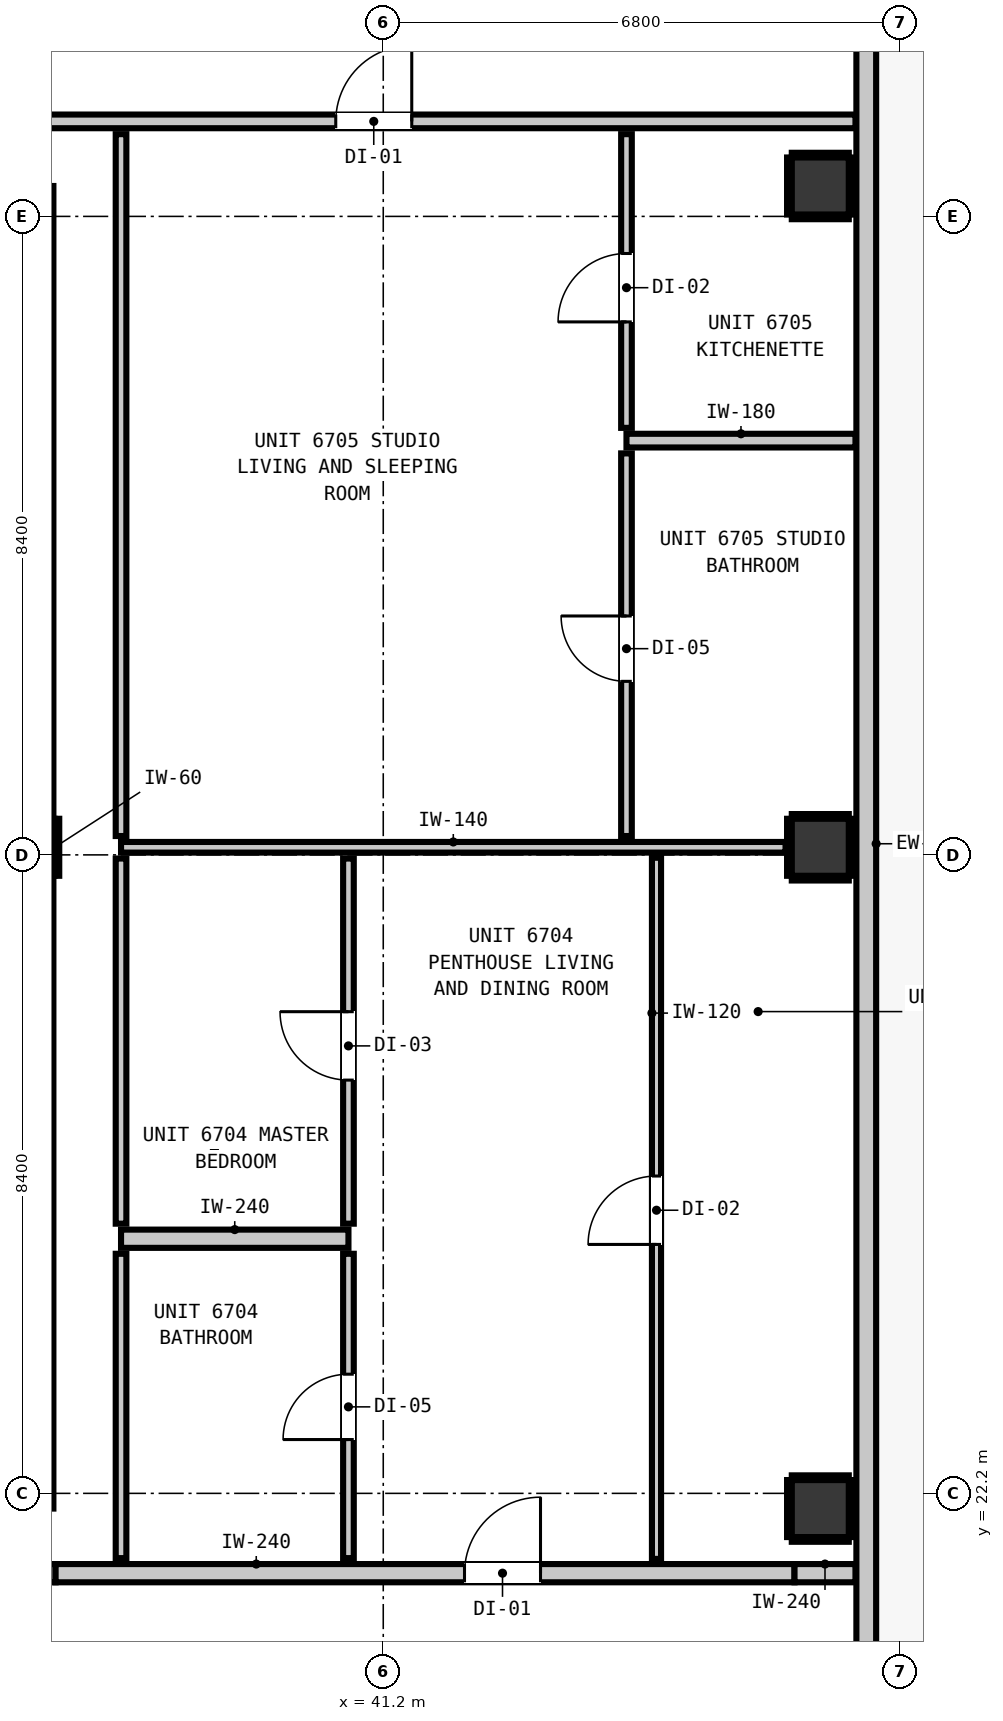
"""IFC4 building model, lengths in metres.
Left out: names, types, materials, properties, quantities, classifications, styles, units other than length and angle.
Written with IfcOpenShell. Run it as: python <this file> out.ifc"""

import sys

from ifc_helpers import new_model, si_unit, direction, frame, frame_2d, origin, origin_2d, place, context, subcontext, project, spatial, rectangle, extrude, element, fill, save


model = new_model("IFC4")
c1 = context("Model", 3, precision=1e-05, world=origin(), true_north=direction((0.0, 1.0)))
c2 = subcontext(c1, "Body", "Model", "MODEL_VIEW")
j1 = project(units=[si_unit("LENGTHUNIT", "METRE"), si_unit("PLANEANGLEUNIT", "RADIAN")], contexts=[c1])
p1 = place(None, origin())
s1 = spatial("IfcSite", under=j1, at=p1, CompositionType="ELEMENT")
p2 = place(p1, origin())
s2 = spatial("IfcBuilding", under=s1, at=p2, CompositionType="ELEMENT")
p3 = place(p2, frame((0.0, 0.0, 231.28)))
s3 = spatial("IfcBuildingStorey", under=s2, at=p3, CompositionType="ELEMENT", Elevation=231.28)
p4 = place(p3, frame((36.5, 30.7, 0.0), z_axis=(0.0, 0.0, 1.0), x_axis=(1.0, 0.0, 0.0)))
e1 = element("IfcColumn", 1, at=p4, inside=s3, PredefinedType="COLUMN", context=c2, shape_type="SweptSolid", body=[
    extrude(rectangle(XDim=0.75, YDim=0.75, at=origin_2d()), origin(), (0.0, 0.0, 1.0), 3.32),
])
p5 = place(p3, frame((36.46, 22.0, 0.0), z_axis=(0.0, 0.0, 1.0), x_axis=(0.0, 1.0, 0.0)))
e2 = element("IfcWall", 2, at=p5, inside=s3, PredefinedType="SHEAR", context=c2, shape_type="SweptSolid", body=[
    extrude(rectangle(XDim=8.32, YDim=0.8, at=frame_2d((4.16, 0.0))), origin(), (0.0, 0.0, 1.0), 3.32),
])
p6 = place(p3, frame((36.46, 31.08, 0.0), z_axis=(0.0, 0.0, 1.0), x_axis=(0.0, 1.0, 0.0)))
e3 = element("IfcWall", 3, at=p6, inside=s3, PredefinedType="SHEAR", context=c2, shape_type="SweptSolid", body=[
    extrude(rectangle(XDim=8.32, YDim=0.8, at=frame_2d((4.16, 0.0))), origin(), (0.0, 0.0, 1.0), 3.32),
])
for number, where, z_axis, x_axis in (
    (4, (46.95, 22.0, -0.2), (0.0, 0.0, 1.0), (1.0, 0.0, 0.0)),
    (5, (46.95, 30.7, -0.2), (0.0, 0.0, 1.0), (1.0, 0.0, 0.0)),
    (6, (46.95, 39.4, -0.2), (0.0, 0.0, 1.0), (1.0, 0.0, 0.0)),
):
    element("IfcColumn", number, at=place(p3, frame(where, z_axis=z_axis, x_axis=x_axis)), inside=s3, PredefinedType="COLUMN", context=c2, shape_type="SweptSolid", body=[
        extrude(rectangle(XDim=0.75, YDim=0.75, at=origin_2d()), origin(), (0.0, 0.0, 1.0), 3.52),
    ])
p7 = place(p3, frame((47.555, 48.855, 0.0), z_axis=(0.0, 0.0, 1.0), x_axis=(0.0, -1.0, 0.0)))
e7 = element("IfcWall", 7, at=p7, inside=s3, PredefinedType="STANDARD", context=c2, shape_type="SweptSolid", body=[
    extrude(rectangle(XDim=30.31, YDim=0.26, at=frame_2d((15.155, 0.0))), origin(), (0.0, 0.0, 1.0), 3.1),
])
p8 = place(p7, frame((0.91, 0.0, 0.0)))
e8 = element("IfcOpeningElement", 8, at=p8, cuts=e7, PredefinedType="OPENING", context=c2, shape_type="SweptSolid", body=[
    extrude(rectangle(XDim=1.0, YDim=2.15, at=frame_2d((0.5, 1.075))), frame((0.0, 0.14, 0.0), z_axis=(0.0, -1.0, 0.0), x_axis=(1.0, 0.0, 0.0)), (0.0, 0.0, 1.0), 0.28),
])
p9 = place(p7, frame((3.107, 0.0, 0.85)))
e9 = element("IfcOpeningElement", 9, at=p9, cuts=e7, PredefinedType="OPENING", context=c2, shape_type="SweptSolid", body=[
    extrude(rectangle(XDim=2.7, YDim=2.0, at=frame_2d((1.35, 1.0))), frame((0.0, 0.14, 0.0), z_axis=(0.0, -1.0, 0.0), x_axis=(1.0, 0.0, 0.0)), (0.0, 0.0, 1.0), 0.28),
])
p10 = place(p3, frame((10.787, 21.15, 0.0), z_axis=(0.0, 0.0, 1.0), x_axis=(1.0, 0.0, 0.0)))
e10 = element("IfcWall", 10, at=p10, inside=s3, PredefinedType="PARTITIONING", context=c2, shape_type="SweptSolid", body=[
    extrude(rectangle(XDim=26.102, YDim=0.24, at=frame_2d((13.051, 0.0))), origin(), (0.0, 0.0, 1.0), 3.1),
])
p11 = place(p10, frame((7.423, 0.0, 0.0)))
e11 = element("IfcOpeningElement", 11, at=p11, cuts=e10, PredefinedType="OPENING", context=c2, shape_type="SweptSolid", body=[
    extrude(rectangle(XDim=1.1, YDim=2.15, at=frame_2d((0.55, 1.075))), frame((0.0, 0.13, 0.0), z_axis=(0.0, -1.0, 0.0), x_axis=(1.0, 0.0, 0.0)), (0.0, 0.0, 1.0), 0.26),
])
p12 = place(p3, frame((36.889, 21.15, 0.0), z_axis=(0.0, 0.0, 1.0), x_axis=(1.0, 0.0, 0.0)))
e12 = element("IfcWall", 12, at=p12, inside=s3, PredefinedType="PARTITIONING", context=c2, shape_type="SweptSolid", body=[
    extrude(rectangle(XDim=9.722, YDim=0.24, at=frame_2d((4.861, 0.0))), origin(), (0.0, 0.0, 1.0), 2.477),
])
p13 = place(p12, frame((5.38, 0.0, 0.0)))
e13 = element("IfcOpeningElement", 13, at=p13, cuts=e12, PredefinedType="OPENING", context=c2, shape_type="SweptSolid", body=[
    extrude(rectangle(XDim=1.0, YDim=2.15, at=frame_2d((0.5, 1.075))), frame((0.0, 0.13, 0.0), z_axis=(0.0, -1.0, 0.0), x_axis=(1.0, 0.0, 0.0)), (0.0, 0.0, 1.0), 0.26),
])
p14 = place(p3, frame((46.611, 21.15, 0.0), z_axis=(0.0, 0.0, 1.0), x_axis=(1.0, 0.0, 0.0)))
e14 = element("IfcWall", 14, at=p14, inside=s3, PredefinedType="PARTITIONING", context=c2, shape_type="SweptSolid", body=[
    extrude(rectangle(XDim=0.802, YDim=0.24, at=frame_2d((0.401, 0.0))), origin(), (0.0, 0.0, 1.0), 3.1),
])
p15 = place(p3, frame((37.75, 25.55, 0.0), z_axis=(0.0, 0.0, 1.0), x_axis=(1.0, 0.0, 0.0)))
e15 = element("IfcWall", 15, at=p15, inside=s3, PredefinedType="PARTITIONING", context=c2, shape_type="SweptSolid", body=[
    extrude(rectangle(XDim=2.992, YDim=0.24, at=frame_2d((1.496, 0.0))), origin(), (0.0, 0.0, 1.0), 3.1),
])
p16 = place(p3, frame((44.4, 36.05, 0.0), z_axis=(0.0, 0.0, 1.0), x_axis=(1.0, 0.0, 0.0)))
e16 = element("IfcWall", 16, at=p16, inside=s3, PredefinedType="PARTITIONING", context=c2, shape_type="SweptSolid", body=[
    extrude(rectangle(XDim=3.013, YDim=0.18, at=frame_2d((1.507, 0.0))), origin(), (0.0, 0.0, 1.0), 3.1),
])
p17 = place(p3, frame((10.787, 40.25, 0.0), z_axis=(0.0, 0.0, 1.0), x_axis=(1.0, 0.0, 0.0)))
e17 = element("IfcWall", 17, at=p17, inside=s3, PredefinedType="PARTITIONING", context=c2, shape_type="SweptSolid", body=[
    extrude(rectangle(XDim=36.626, YDim=0.18, at=frame_2d((18.313, 0.0))), origin(), (0.0, 0.0, 1.0), 3.1),
])
p18 = place(p17, frame((6.648, 0.0, 0.0)))
e18 = element("IfcOpeningElement", 18, at=p18, cuts=e17, PredefinedType="OPENING", context=c2, shape_type="SweptSolid", body=[
    extrude(rectangle(XDim=1.4, YDim=2.15, at=frame_2d((0.7, 1.075))), frame((0.0, 0.1, 0.0), z_axis=(0.0, -1.0, 0.0), x_axis=(1.0, 0.0, 0.0)), (0.0, 0.0, 1.0), 0.2),
])
p19 = place(p17, frame((29.788, 0.0, 0.0)))
e19 = element("IfcOpeningElement", 19, at=p19, cuts=e17, PredefinedType="OPENING", context=c2, shape_type="SweptSolid", body=[
    extrude(rectangle(XDim=1.0, YDim=2.15, at=frame_2d((0.5, 1.075))), frame((0.0, 0.1, 0.0), z_axis=(0.0, -1.0, 0.0), x_axis=(1.0, 0.0, 0.0)), (0.0, 0.0, 1.0), 0.2),
])
p20 = place(p3, frame((37.75, 30.7, 0.0), z_axis=(0.0, 0.0, 1.0), x_axis=(1.0, 0.0, 0.0)))
e20 = element("IfcWall", 20, at=p20, inside=s3, PredefinedType="PARTITIONING", context=c2, shape_type="SweptSolid", body=[
    extrude(rectangle(XDim=8.743, YDim=0.14, at=frame_2d((4.372, 0.0))), origin(), (0.0, 0.0, 1.0), 2.335),
])
p21 = place(p3, frame((37.75, 21.348, 0.0), z_axis=(0.0, 0.0, 1.0), x_axis=(0.0, 1.0, 0.0)))
e21 = element("IfcWall", 21, at=p21, inside=s3, PredefinedType="PARTITIONING", context=c2, shape_type="SweptSolid", body=[
    extrude(rectangle(XDim=4.004, YDim=0.14, at=frame_2d((2.002, 0.0))), origin(), (0.0, 0.0, 1.0), 3.1),
])
p22 = place(p3, frame((37.75, 25.748, 0.0), z_axis=(0.0, 0.0, 1.0), x_axis=(0.0, 1.0, 0.0)))
e22 = element("IfcWall", 22, at=p22, inside=s3, PredefinedType="PARTITIONING", context=c2, shape_type="SweptSolid", body=[
    extrude(rectangle(XDim=4.804, YDim=0.14, at=frame_2d((2.402, 0.0))), origin(), (0.0, 0.0, 1.0), 3.1),
])
p23 = place(p3, frame((37.75, 30.848, 0.0), z_axis=(0.0, 0.0, 1.0), x_axis=(0.0, 1.0, 0.0)))
e23 = element("IfcWall", 23, at=p23, inside=s3, PredefinedType="PARTITIONING", context=c2, shape_type="SweptSolid", body=[
    extrude(rectangle(XDim=9.234, YDim=0.14, at=frame_2d((4.617, 0.0))), origin(), (0.0, 0.0, 1.0), 3.1),
])
p24 = place(p3, frame((40.742, 21.348, 0.0), z_axis=(0.0, 0.0, 1.0), x_axis=(0.0, 1.0, 0.0)))
e24 = element("IfcWall", 24, at=p24, inside=s3, PredefinedType="PARTITIONING", context=c2, shape_type="SweptSolid", body=[
    extrude(rectangle(XDim=4.004, YDim=0.14, at=frame_2d((2.002, 0.0))), origin(), (0.0, 0.0, 1.0), 3.1),
])
p25 = place(p24, frame((1.56, 0.0, 0.0)))
e25 = element("IfcOpeningElement", 25, at=p25, cuts=e24, PredefinedType="OPENING", context=c2, shape_type="SweptSolid", body=[
    extrude(rectangle(XDim=0.86, YDim=2.02, at=frame_2d((0.43, 1.01))), frame((0.0, 0.08, 0.0), z_axis=(0.0, -1.0, 0.0), x_axis=(1.0, 0.0, 0.0)), (0.0, 0.0, 1.0), 0.16),
])
p26 = place(p3, frame((40.742, 25.748, 0.0), z_axis=(0.0, 0.0, 1.0), x_axis=(0.0, 1.0, 0.0)))
e26 = element("IfcWall", 26, at=p26, inside=s3, PredefinedType="PARTITIONING", context=c2, shape_type="SweptSolid", body=[
    extrude(rectangle(XDim=4.804, YDim=0.14, at=frame_2d((2.402, 0.0))), origin(), (0.0, 0.0, 1.0), 3.1),
])
p27 = place(p26, frame((1.889, 0.0, 0.0)))
e27 = element("IfcOpeningElement", 27, at=p27, cuts=e26, PredefinedType="OPENING", context=c2, shape_type="SweptSolid", body=[
    extrude(rectangle(XDim=0.9, YDim=2.1, at=frame_2d((0.45, 1.05))), frame((0.0, 0.08, 0.0), z_axis=(0.0, -1.0, 0.0), x_axis=(1.0, 0.0, 0.0)), (0.0, 0.0, 1.0), 0.16),
])
p28 = place(p3, frame((44.4, 30.848, 0.0), z_axis=(0.0, 0.0, 1.0), x_axis=(0.0, 1.0, 0.0)))
e28 = element("IfcWall", 28, at=p28, inside=s3, PredefinedType="PARTITIONING", context=c2, shape_type="SweptSolid", body=[
    extrude(rectangle(XDim=5.034, YDim=0.14, at=frame_2d((2.517, 0.0))), origin(), (0.0, 0.0, 1.0), 3.1),
])
p29 = place(p28, frame((2.035, 0.0, 0.0)))
e29 = element("IfcOpeningElement", 29, at=p29, cuts=e28, PredefinedType="OPENING", context=c2, shape_type="SweptSolid", body=[
    extrude(rectangle(XDim=0.86, YDim=2.02, at=frame_2d((0.43, 1.01))), frame((0.0, 0.08, 0.0), z_axis=(0.0, -1.0, 0.0), x_axis=(1.0, 0.0, 0.0)), (0.0, 0.0, 1.0), 0.16),
])
p30 = place(p3, frame((44.4, 36.218, 0.0), z_axis=(0.0, 0.0, 1.0), x_axis=(0.0, 1.0, 0.0)))
e30 = element("IfcWall", 30, at=p30, inside=s3, PredefinedType="PARTITIONING", context=c2, shape_type="SweptSolid", body=[
    extrude(rectangle(XDim=3.864, YDim=0.14, at=frame_2d((1.932, 0.0))), origin(), (0.0, 0.0, 1.0), 3.1),
])
p31 = place(p30, frame((1.394, 0.0, 0.0)))
e31 = element("IfcOpeningElement", 31, at=p31, cuts=e30, PredefinedType="OPENING", context=c2, shape_type="SweptSolid", body=[
    extrude(rectangle(XDim=0.9, YDim=2.1, at=frame_2d((0.45, 1.05))), frame((0.0, 0.08, 0.0), z_axis=(0.0, -1.0, 0.0), x_axis=(1.0, 0.0, 0.0)), (0.0, 0.0, 1.0), 0.16),
])
p32 = place(p3, frame((44.795, 21.338, 0.0), z_axis=(0.0, 0.0, 1.0), x_axis=(0.0, 1.0, 0.0)))
e32 = element("IfcWall", 32, at=p32, inside=s3, PredefinedType="PARTITIONING", context=c2, shape_type="SweptSolid", body=[
    extrude(rectangle(XDim=9.224, YDim=0.12, at=frame_2d((4.612, 0.0))), origin(), (0.0, 0.0, 1.0), 3.1),
])
p33 = place(p32, frame((4.137, 0.0, 0.0)))
e33 = element("IfcOpeningElement", 33, at=p33, cuts=e32, PredefinedType="OPENING", context=c2, shape_type="SweptSolid", body=[
    extrude(rectangle(XDim=0.9, YDim=2.1, at=frame_2d((0.45, 1.05))), frame((0.0, 0.07, 0.0), z_axis=(0.0, -1.0, 0.0), x_axis=(1.0, 0.0, 0.0)), (0.0, 0.0, 1.0), 0.14),
])
for number, where, z_axis, x_axis in (
    (34, (36.907, 30.325, 0.0), (0.0, 0.0, 1.0), (0.0, 1.0, 0.0)),
    (35, (46.575, 21.593, 0.0), (0.0, 0.0, 1.0), (1.0, 0.0, 0.0)),
    (36, (46.575, 22.407, 0.0), (0.0, 0.0, 1.0), (1.0, 0.0, 0.0)),
    (37, (46.543, 21.625, 0.0), (0.0, 0.0, 1.0), (0.0, 1.0, 0.0)),
    (38, (47.357, 21.625, 0.0), (0.0, 0.0, 1.0), (0.0, 1.0, 0.0)),
    (39, (46.575, 30.293, 0.0), (0.0, 0.0, 1.0), (1.0, 0.0, 0.0)),
    (40, (46.575, 31.107, 0.0), (0.0, 0.0, 1.0), (1.0, 0.0, 0.0)),
    (41, (46.543, 30.325, 0.0), (0.0, 0.0, 1.0), (0.0, 1.0, 0.0)),
    (42, (47.357, 30.325, 0.0), (0.0, 0.0, 1.0), (0.0, 1.0, 0.0)),
    (43, (46.575, 38.993, 0.0), (0.0, 0.0, 1.0), (1.0, 0.0, 0.0)),
    (44, (46.575, 39.807, 0.0), (0.0, 0.0, 1.0), (1.0, 0.0, 0.0)),
    (45, (46.543, 39.025, 0.0), (0.0, 0.0, 1.0), (0.0, 1.0, 0.0)),
    (46, (47.357, 39.025, 0.0), (0.0, 0.0, 1.0), (0.0, 1.0, 0.0)),
):
    element("IfcWall", number, at=place(p3, frame(where, z_axis=z_axis, x_axis=x_axis)), inside=s3, PredefinedType="PARTITIONING", context=c2, shape_type="SweptSolid", body=[
        extrude(rectangle(XDim=0.75, YDim=0.06, at=frame_2d((0.375, 0.0))), origin(), (0.0, 0.0, 1.0), 1.45),
    ])
p34 = place(p13, origin())
e47 = element("IfcDoor", 47, at=p34, inside=s3, OperationType="SINGLE_SWING_RIGHT", PredefinedType="DOOR", context=c2, shape_type="SweptSolid", body=[
    extrude(rectangle(XDim=1.0, YDim=2.15, at=frame_2d((0.5, 1.075))), frame((0.0, 0.025, 0.0), z_axis=(0.0, -1.0, 0.0), x_axis=(1.0, 0.0, 0.0)), (0.0, 0.0, 1.0), 0.05),
])
fill(e13, e47)
p35 = place(p25, origin())
e48 = element("IfcDoor", 48, at=p35, inside=s3, OperationType="SINGLE_SWING_LEFT", PredefinedType="DOOR", context=c2, shape_type="SweptSolid", body=[
    extrude(rectangle(XDim=0.86, YDim=2.02, at=frame_2d((0.43, 1.01))), frame((0.0, 0.025, 0.0), z_axis=(0.0, -1.0, 0.0), x_axis=(1.0, 0.0, 0.0)), (0.0, 0.0, 1.0), 0.05),
])
fill(e25, e48)
p36 = place(p27, origin())
e49 = element("IfcDoor", 49, at=p36, inside=s3, OperationType="SINGLE_SWING_RIGHT", PredefinedType="DOOR", context=c2, shape_type="SweptSolid", body=[
    extrude(rectangle(XDim=0.9, YDim=2.1, at=frame_2d((0.45, 1.05))), frame((0.0, 0.025, 0.0), z_axis=(0.0, -1.0, 0.0), x_axis=(1.0, 0.0, 0.0)), (0.0, 0.0, 1.0), 0.05),
])
fill(e27, e49)
p37 = place(p33, origin())
e50 = element("IfcDoor", 50, at=p37, inside=s3, OperationType="SINGLE_SWING_LEFT", PredefinedType="DOOR", context=c2, shape_type="SweptSolid", body=[
    extrude(rectangle(XDim=0.9, YDim=2.1, at=frame_2d((0.45, 1.05))), frame((0.0, 0.025, 0.0), z_axis=(0.0, -1.0, 0.0), x_axis=(1.0, 0.0, 0.0)), (0.0, 0.0, 1.0), 0.05),
])
fill(e33, e50)
p38 = place(p19, origin())
e51 = element("IfcDoor", 51, at=p38, inside=s3, OperationType="SINGLE_SWING_RIGHT", PredefinedType="DOOR", context=c2, shape_type="SweptSolid", body=[
    extrude(rectangle(XDim=1.0, YDim=2.15, at=frame_2d((0.5, 1.075))), frame((0.0, 0.025, 0.0), z_axis=(0.0, -1.0, 0.0), x_axis=(1.0, 0.0, 0.0)), (0.0, 0.0, 1.0), 0.05),
])
fill(e19, e51)
p39 = place(p31, origin())
e52 = element("IfcDoor", 52, at=p39, inside=s3, OperationType="SINGLE_SWING_LEFT", PredefinedType="DOOR", context=c2, shape_type="SweptSolid", body=[
    extrude(rectangle(XDim=0.9, YDim=2.1, at=frame_2d((0.45, 1.05))), frame((0.0, 0.025, 0.0), z_axis=(0.0, -1.0, 0.0), x_axis=(1.0, 0.0, 0.0)), (0.0, 0.0, 1.0), 0.05),
])
fill(e31, e52)
p40 = place(p29, origin())
e53 = element("IfcDoor", 53, at=p40, inside=s3, OperationType="SINGLE_SWING_RIGHT", PredefinedType="DOOR", context=c2, shape_type="SweptSolid", body=[
    extrude(rectangle(XDim=0.86, YDim=2.02, at=frame_2d((0.43, 1.01))), frame((0.0, 0.025, 0.0), z_axis=(0.0, -1.0, 0.0), x_axis=(1.0, 0.0, 0.0)), (0.0, 0.0, 1.0), 0.05),
])
fill(e29, e53)
save(model, sys.argv[1])
